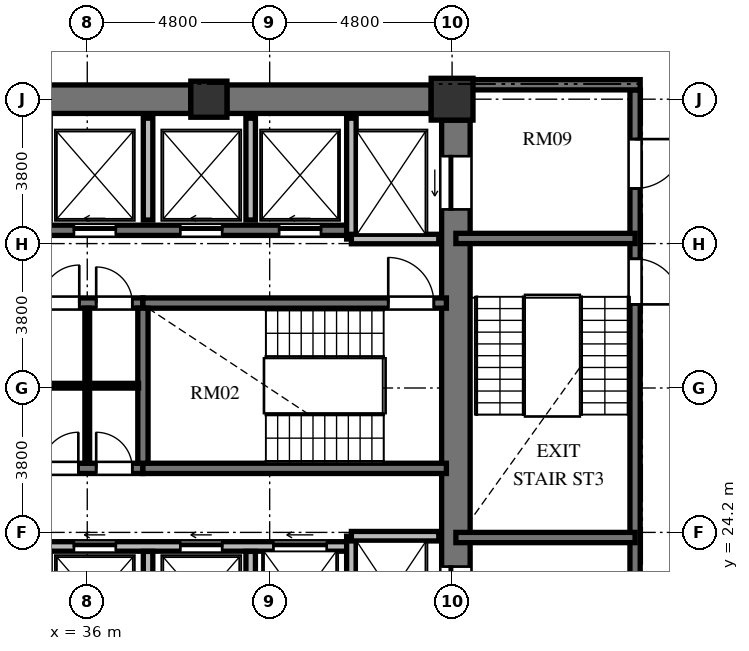
"""IFC4 building model, lengths in metres.
Left out: names, types, materials, properties, quantities, classifications, styles, units other than length and angle.
Written with IfcOpenShell. Run it as: python <this file> out.ifc"""

import sys

from ifc_helpers import new_model, si_unit, direction, frame, frame_2d, origin, origin_2d, place, context, subcontext, project, spatial, rectangle, extrude, element, fill, save


model = new_model("IFC4")
c1 = context("Model", 3, precision=1e-05, world=origin(), true_north=direction((0.0, 1.0)))
c2 = subcontext(c1, "Body", "Model", "MODEL_VIEW")
j1 = project(units=[si_unit("LENGTHUNIT", "METRE"), si_unit("PLANEANGLEUNIT", "RADIAN")], contexts=[c1])
p1 = place(None, origin())
s1 = spatial("IfcSite", under=j1, at=p1, CompositionType="ELEMENT")
p2 = place(p1, origin())
s2 = spatial("IfcBuilding", under=s1, at=p2, CompositionType="ELEMENT")
p3 = place(p2, frame((0.0, 0.0, 110.928)))
s3 = spatial("IfcBuildingStorey", under=s2, at=p3, CompositionType="ELEMENT", Elevation=110.928)
p4 = place(p3, frame((45.6, 35.6, 0.0), z_axis=(0.0, 0.0, 1.0), x_axis=(1.0, 0.0, 0.0)))
e1 = element("IfcColumn", 1, at=p4, inside=s3, PredefinedType="COLUMN", context=c2, shape_type="SweptSolid", body=[
    extrude(rectangle(XDim=1.1, YDim=1.1, at=origin_2d()), origin(), (0.0, 0.0, 1.0), 3.648),
])
p5 = place(p3, frame((39.2, 35.6, 0.0), z_axis=(0.0, 0.0, 1.0), x_axis=(1.0, 0.0, 0.0)))
e2 = element("IfcColumn", 2, at=p5, inside=s3, PredefinedType="COLUMN", context=c2, shape_type="SweptSolid", body=[
    extrude(rectangle(XDim=0.95, YDim=0.95, at=origin_2d()), origin(), (0.0, 0.0, 1.0), 3.648),
])
p6 = place(p3, frame((45.7, 20.95, 0.0), z_axis=(0.0, 0.0, 1.0), x_axis=(0.0, 1.0, 0.0)))
e3 = element("IfcWall", 3, at=p6, inside=s3, PredefinedType="SHEAR", context=c2, shape_type="SweptSolid", body=[
    extrude(rectangle(XDim=14.1, YDim=0.75, at=frame_2d((7.05, 0.0))), origin(), (0.0, 0.0, 1.0), 3.648),
])
p7 = place(p6, frame((11.75, 0.0, 0.0)))
e4 = element("IfcOpeningElement", 4, at=p7, cuts=e3, PredefinedType="OPENING", context=c2, shape_type="SweptSolid", body=[
    extrude(rectangle(XDim=1.4, YDim=2.3, at=frame_2d((0.7, 1.15))), frame((0.0, 0.385, 0.0), z_axis=(0.0, -1.0, 0.0), x_axis=(1.0, 0.0, 0.0)), (0.0, 0.0, 1.0), 0.77),
])
p8 = place(p6, frame((0.95, 0.0, 0.0)))
e5 = element("IfcOpeningElement", 5, at=p8, cuts=e3, PredefinedType="OPENING", context=c2, shape_type="SweptSolid", body=[
    extrude(rectangle(XDim=1.4, YDim=2.3, at=frame_2d((0.7, 1.15))), frame((0.0, 0.385, 0.0), z_axis=(0.0, -1.0, 0.0), x_axis=(1.0, 0.0, 0.0)), (0.0, 0.0, 1.0), 0.77),
])
p9 = place(p3, frame((33.275, 35.6, 0.0), z_axis=(0.0, 0.0, 1.0), x_axis=(1.0, 0.0, 0.0)))
e6 = element("IfcWall", 6, at=p9, inside=s3, PredefinedType="SHEAR", context=c2, shape_type="SweptSolid", body=[
    extrude(rectangle(XDim=5.45, YDim=0.75, at=frame_2d((2.725, 0.0))), origin(), (0.0, 0.0, 1.0), 3.648),
])
p10 = place(p3, frame((39.675, 35.6, 0.0), z_axis=(0.0, 0.0, 1.0), x_axis=(1.0, 0.0, 0.0)))
e7 = element("IfcWall", 7, at=p10, inside=s3, PredefinedType="SHEAR", context=c2, shape_type="SweptSolid", body=[
    extrude(rectangle(XDim=5.375, YDim=0.75, at=frame_2d((2.688, 0.0))), origin(), (0.0, 0.0, 1.0), 3.648),
])
p11 = place(p3, frame((34.535, 30.235, 0.0), z_axis=(0.0, 0.0, 1.0), x_axis=(1.0, 0.0, 0.0)))
e8 = element("IfcWall", 8, at=p11, inside=s3, PredefinedType="SHEAR", context=c2, shape_type="SweptSolid", body=[
    extrude(rectangle(XDim=2.93, YDim=0.27, at=frame_2d((1.465, 0.0))), origin(), (0.0, 0.0, 1.0), 3.648),
])
p12 = place(p11, frame((0.255, 0.0, 0.0)))
e9 = element("IfcOpeningElement", 9, at=p12, cuts=e8, PredefinedType="OPENING", context=c2, shape_type="SweptSolid", body=[
    extrude(rectangle(XDim=1.0, YDim=2.1, at=frame_2d((0.5, 1.05))), frame((0.0, 0.145, 0.0), z_axis=(0.0, -1.0, 0.0), x_axis=(1.0, 0.0, 0.0)), (0.0, 0.0, 1.0), 0.29),
])
p13 = place(p11, frame((1.7, 0.0, 0.0)))
e10 = element("IfcOpeningElement", 10, at=p13, cuts=e8, PredefinedType="OPENING", context=c2, shape_type="SweptSolid", body=[
    extrude(rectangle(XDim=0.95, YDim=2.1, at=frame_2d((0.475, 1.05))), frame((0.0, 0.145, 0.0), z_axis=(0.0, -1.0, 0.0), x_axis=(1.0, 0.0, 0.0)), (0.0, 0.0, 1.0), 0.29),
])
p14 = place(p3, frame((37.465, 30.235, 0.0), z_axis=(0.0, 0.0, 1.0), x_axis=(1.0, 0.0, 0.0)))
e11 = element("IfcWall", 11, at=p14, inside=s3, PredefinedType="SHEAR", context=c2, shape_type="SweptSolid", body=[
    extrude(rectangle(XDim=7.985, YDim=0.27, at=frame_2d((3.992, 0.0))), origin(), (0.0, 0.0, 1.0), 3.648),
])
p15 = place(p14, frame((6.455, 0.0, 0.0)))
e12 = element("IfcOpeningElement", 12, at=p15, cuts=e11, PredefinedType="OPENING", context=c2, shape_type="SweptSolid", body=[
    extrude(rectangle(XDim=1.2, YDim=2.15, at=frame_2d((0.6, 1.075))), frame((0.0, 0.145, 0.0), z_axis=(0.0, -1.0, 0.0), x_axis=(1.0, 0.0, 0.0)), (0.0, 0.0, 1.0), 0.29),
])
p16 = place(p3, frame((34.535, 25.885, 0.0), z_axis=(0.0, 0.0, 1.0), x_axis=(1.0, 0.0, 0.0)))
e13 = element("IfcWall", 13, at=p16, inside=s3, PredefinedType="SHEAR", context=c2, shape_type="SweptSolid", body=[
    extrude(rectangle(XDim=2.93, YDim=0.27, at=frame_2d((1.465, 0.0))), origin(), (0.0, 0.0, 1.0), 3.648),
])
p17 = place(p16, frame((0.28, 0.0, 0.0)))
e14 = element("IfcOpeningElement", 14, at=p17, cuts=e13, PredefinedType="OPENING", context=c2, shape_type="SweptSolid", body=[
    extrude(rectangle(XDim=0.95, YDim=2.1, at=frame_2d((0.475, 1.05))), frame((0.0, 0.145, 0.0), z_axis=(0.0, -1.0, 0.0), x_axis=(1.0, 0.0, 0.0)), (0.0, 0.0, 1.0), 0.29),
])
p18 = place(p16, frame((1.7, 0.0, 0.0)))
e15 = element("IfcOpeningElement", 15, at=p18, cuts=e13, PredefinedType="OPENING", context=c2, shape_type="SweptSolid", body=[
    extrude(rectangle(XDim=0.95, YDim=2.1, at=frame_2d((0.475, 1.05))), frame((0.0, 0.145, 0.0), z_axis=(0.0, -1.0, 0.0), x_axis=(1.0, 0.0, 0.0)), (0.0, 0.0, 1.0), 0.29),
])
p19 = place(p3, frame((37.465, 25.885, 0.0), z_axis=(0.0, 0.0, 1.0), x_axis=(1.0, 0.0, 0.0)))
e16 = element("IfcWall", 16, at=p19, inside=s3, PredefinedType="SHEAR", context=c2, shape_type="SweptSolid", body=[
    extrude(rectangle(XDim=7.985, YDim=0.27, at=frame_2d((3.992, 0.0))), origin(), (0.0, 0.0, 1.0), 3.648),
])
p20 = place(p3, frame((37.465, 26.02, 0.0), z_axis=(0.0, 0.0, 1.0), x_axis=(0.0, 1.0, 0.0)))
e17 = element("IfcWall", 17, at=p20, inside=s3, PredefinedType="SHEAR", context=c2, shape_type="SweptSolid", body=[
    extrude(rectangle(XDim=4.08, YDim=0.27, at=frame_2d((2.04, 0.0))), origin(), (0.0, 0.0, 1.0), 3.648),
])
p21 = place(p3, frame((34.65, 28.06, 0.0), z_axis=(0.0, 0.0, 1.0), x_axis=(1.0, 0.0, 0.0)))
e18 = element("IfcWall", 18, at=p21, inside=s3, PredefinedType="PARTITIONING", context=c2, shape_type="SweptSolid", body=[
    extrude(rectangle(XDim=2.7, YDim=0.125, at=frame_2d((1.35, 0.0))), origin(), (0.0, 0.0, 1.0), 3.428),
])
p22 = place(p3, frame((36.0, 26.02, 0.0), z_axis=(0.0, 0.0, 1.0), x_axis=(0.0, 1.0, 0.0)))
e19 = element("IfcWall", 19, at=p22, inside=s3, PredefinedType="PARTITIONING", context=c2, shape_type="SweptSolid", body=[
    extrude(rectangle(XDim=4.08, YDim=0.125, at=frame_2d((2.04, 0.0))), origin(), (0.0, 0.0, 1.0), 3.428),
])
p23 = place(p3, frame((26.55, 32.15, 0.0), z_axis=(0.0, 0.0, 1.0), x_axis=(1.0, 0.0, 0.0)))
e20 = element("IfcWall", 20, at=p23, inside=s3, PredefinedType="SHEAR", context=c2, shape_type="SweptSolid", body=[
    extrude(rectangle(XDim=16.4, YDim=0.27, at=frame_2d((8.2, 0.0))), origin(), (0.0, 0.0, 1.0), 3.648),
])
p24 = place(p23, frame((1.1, 0.0, 0.0)))
e21 = element("IfcOpeningElement", 21, at=p24, cuts=e20, PredefinedType="OPENING", context=c2, shape_type="SweptSolid", body=[
    extrude(rectangle(XDim=1.1, YDim=2.2, at=frame_2d((0.55, 1.1))), frame((0.0, 0.145, 0.0), z_axis=(0.0, -1.0, 0.0), x_axis=(1.0, 0.0, 0.0)), (0.0, 0.0, 1.0), 0.29),
])
p25 = place(p23, frame((3.7, 0.0, 0.0)))
e22 = element("IfcOpeningElement", 22, at=p25, cuts=e20, PredefinedType="OPENING", context=c2, shape_type="SweptSolid", body=[
    extrude(rectangle(XDim=1.1, YDim=2.2, at=frame_2d((0.55, 1.1))), frame((0.0, 0.145, 0.0), z_axis=(0.0, -1.0, 0.0), x_axis=(1.0, 0.0, 0.0)), (0.0, 0.0, 1.0), 0.29),
])
p26 = place(p23, frame((6.5, 0.0, 0.0)))
e23 = element("IfcOpeningElement", 23, at=p26, cuts=e20, PredefinedType="OPENING", context=c2, shape_type="SweptSolid", body=[
    extrude(rectangle(XDim=1.1, YDim=2.2, at=frame_2d((0.55, 1.1))), frame((0.0, 0.145, 0.0), z_axis=(0.0, -1.0, 0.0), x_axis=(1.0, 0.0, 0.0)), (0.0, 0.0, 1.0), 0.29),
])
p27 = place(p23, frame((9.1, 0.0, 0.0)))
e24 = element("IfcOpeningElement", 24, at=p27, cuts=e20, PredefinedType="OPENING", context=c2, shape_type="SweptSolid", body=[
    extrude(rectangle(XDim=1.1, YDim=2.2, at=frame_2d((0.55, 1.1))), frame((0.0, 0.145, 0.0), z_axis=(0.0, -1.0, 0.0), x_axis=(1.0, 0.0, 0.0)), (0.0, 0.0, 1.0), 0.29),
])
p28 = place(p23, frame((11.9, 0.0, 0.0)))
e25 = element("IfcOpeningElement", 25, at=p28, cuts=e20, PredefinedType="OPENING", context=c2, shape_type="SweptSolid", body=[
    extrude(rectangle(XDim=1.1, YDim=2.2, at=frame_2d((0.55, 1.1))), frame((0.0, 0.145, 0.0), z_axis=(0.0, -1.0, 0.0), x_axis=(1.0, 0.0, 0.0)), (0.0, 0.0, 1.0), 0.29),
])
p29 = place(p23, frame((14.5, 0.0, 0.0)))
e26 = element("IfcOpeningElement", 26, at=p29, cuts=e20, PredefinedType="OPENING", context=c2, shape_type="SweptSolid", body=[
    extrude(rectangle(XDim=1.1, YDim=2.2, at=frame_2d((0.55, 1.1))), frame((0.0, 0.145, 0.0), z_axis=(0.0, -1.0, 0.0), x_axis=(1.0, 0.0, 0.0)), (0.0, 0.0, 1.0), 0.29),
])
p30 = place(p3, frame((26.75, 23.83, 0.0), z_axis=(0.0, 0.0, 1.0), x_axis=(1.0, 0.0, 0.0)))
e27 = element("IfcWall", 27, at=p30, inside=s3, PredefinedType="SOLIDWALL", context=c2, shape_type="SweptSolid", body=[
    extrude(rectangle(XDim=16.2, YDim=0.25, at=frame_2d((8.1, 0.0))), origin(), (0.0, 0.0, 1.0), 3.428),
])
p31 = place(p30, frame((0.9, 0.0, 0.0)))
e28 = element("IfcOpeningElement", 28, at=p31, cuts=e27, PredefinedType="OPENING", context=c2, shape_type="SweptSolid", body=[
    extrude(rectangle(XDim=1.1, YDim=2.2, at=frame_2d((0.55, 1.1))), frame((0.0, 0.135, 0.0), z_axis=(0.0, -1.0, 0.0), x_axis=(1.0, 0.0, 0.0)), (0.0, 0.0, 1.0), 0.27),
])
p32 = place(p30, frame((3.5, 0.0, 0.0)))
e29 = element("IfcOpeningElement", 29, at=p32, cuts=e27, PredefinedType="OPENING", context=c2, shape_type="SweptSolid", body=[
    extrude(rectangle(XDim=1.1, YDim=2.2, at=frame_2d((0.55, 1.1))), frame((0.0, 0.135, 0.0), z_axis=(0.0, -1.0, 0.0), x_axis=(1.0, 0.0, 0.0)), (0.0, 0.0, 1.0), 0.27),
])
p33 = place(p30, frame((6.3, 0.0, 0.0)))
e30 = element("IfcOpeningElement", 30, at=p33, cuts=e27, PredefinedType="OPENING", context=c2, shape_type="SweptSolid", body=[
    extrude(rectangle(XDim=1.1, YDim=2.2, at=frame_2d((0.55, 1.1))), frame((0.0, 0.135, 0.0), z_axis=(0.0, -1.0, 0.0), x_axis=(1.0, 0.0, 0.0)), (0.0, 0.0, 1.0), 0.27),
])
p34 = place(p30, frame((8.9, 0.0, 0.0)))
e31 = element("IfcOpeningElement", 31, at=p34, cuts=e27, PredefinedType="OPENING", context=c2, shape_type="SweptSolid", body=[
    extrude(rectangle(XDim=1.1, YDim=2.2, at=frame_2d((0.55, 1.1))), frame((0.0, 0.135, 0.0), z_axis=(0.0, -1.0, 0.0), x_axis=(1.0, 0.0, 0.0)), (0.0, 0.0, 1.0), 0.27),
])
p35 = place(p30, frame((11.7, 0.0, 0.0)))
e32 = element("IfcOpeningElement", 32, at=p35, cuts=e27, PredefinedType="OPENING", context=c2, shape_type="SweptSolid", body=[
    extrude(rectangle(XDim=1.1, YDim=2.2, at=frame_2d((0.55, 1.1))), frame((0.0, 0.135, 0.0), z_axis=(0.0, -1.0, 0.0), x_axis=(1.0, 0.0, 0.0)), (0.0, 0.0, 1.0), 0.27),
])
p36 = place(p30, frame((14.15, 0.0, 0.0)))
e33 = element("IfcOpeningElement", 33, at=p36, cuts=e27, PredefinedType="OPENING", context=c2, shape_type="SweptSolid", body=[
    extrude(rectangle(XDim=1.4, YDim=2.3, at=frame_2d((0.7, 1.15))), frame((0.0, 0.135, 0.0), z_axis=(0.0, -1.0, 0.0), x_axis=(1.0, 0.0, 0.0)), (0.0, 0.0, 1.0), 0.27),
])
p37 = place(p3, frame((42.95, 31.92, 0.0), z_axis=(0.0, 0.0, 1.0), x_axis=(0.0, 1.0, 0.0)))
e34 = element("IfcWall", 34, at=p37, inside=s3, PredefinedType="SOLIDWALL", context=c2, shape_type="SweptSolid", body=[
    extrude(rectangle(XDim=3.18, YDim=0.25, at=frame_2d((1.59, 0.0))), origin(), (0.0, 0.0, 1.0), 3.428),
])
p38 = place(p3, frame((42.95, 31.92, 0.0), z_axis=(0.0, 0.0, 1.0), x_axis=(1.0, 0.0, 0.0)))
e35 = element("IfcWall", 35, at=p38, inside=s3, PredefinedType="SOLIDWALL", context=c2, shape_type="SweptSolid", body=[
    extrude(rectangle(XDim=2.3, YDim=0.25, at=frame_2d((1.15, 0.0))), origin(), (0.0, 0.0, 1.0), 3.428),
])
p39 = place(p3, frame((42.95, 20.9, 0.0), z_axis=(0.0, 0.0, 1.0), x_axis=(0.0, 1.0, 0.0)))
e36 = element("IfcWall", 36, at=p39, inside=s3, PredefinedType="SOLIDWALL", context=c2, shape_type="SweptSolid", body=[
    extrude(rectangle(XDim=3.2, YDim=0.25, at=frame_2d((1.6, 0.0))), origin(), (0.0, 0.0, 1.0), 3.428),
])
p40 = place(p3, frame((42.95, 24.1, 0.0), z_axis=(0.0, 0.0, 1.0), x_axis=(1.0, 0.0, 0.0)))
e37 = element("IfcWall", 37, at=p40, inside=s3, PredefinedType="SOLIDWALL", context=c2, shape_type="SweptSolid", body=[
    extrude(rectangle(XDim=2.3, YDim=0.25, at=frame_2d((1.15, 0.0))), origin(), (0.0, 0.0, 1.0), 3.428),
])
p41 = place(p3, frame((37.6, 32.42, 0.0), z_axis=(0.0, 0.0, 1.0), x_axis=(0.0, 1.0, 0.0)))
e38 = element("IfcWall", 38, at=p41, inside=s3, PredefinedType="SOLIDWALL", context=c2, shape_type="SweptSolid", body=[
    extrude(rectangle(XDim=2.68, YDim=0.25, at=frame_2d((1.34, 0.0))), origin(), (0.0, 0.0, 1.0), 3.428),
])
p42 = place(p3, frame((37.6, 20.9, 0.0), z_axis=(0.0, 0.0, 1.0), x_axis=(0.0, 1.0, 0.0)))
e39 = element("IfcWall", 39, at=p42, inside=s3, PredefinedType="SOLIDWALL", context=c2, shape_type="SweptSolid", body=[
    extrude(rectangle(XDim=2.8, YDim=0.25, at=frame_2d((1.4, 0.0))), origin(), (0.0, 0.0, 1.0), 3.428),
])
p43 = place(p3, frame((40.3, 32.42, 0.0), z_axis=(0.0, 0.0, 1.0), x_axis=(0.0, 1.0, 0.0)))
e40 = element("IfcWall", 40, at=p43, inside=s3, PredefinedType="SOLIDWALL", context=c2, shape_type="SweptSolid", body=[
    extrude(rectangle(XDim=2.68, YDim=0.25, at=frame_2d((1.34, 0.0))), origin(), (0.0, 0.0, 1.0), 3.428),
])
p44 = place(p3, frame((40.3, 20.9, 0.0), z_axis=(0.0, 0.0, 1.0), x_axis=(0.0, 1.0, 0.0)))
e41 = element("IfcWall", 41, at=p44, inside=s3, PredefinedType="SOLIDWALL", context=c2, shape_type="SweptSolid", body=[
    extrude(rectangle(XDim=2.8, YDim=0.25, at=frame_2d((1.4, 0.0))), origin(), (0.0, 0.0, 1.0), 3.428),
])
p45 = place(p3, frame((50.415, 35.845, 0.0), z_axis=(0.0, 0.0, 1.0), x_axis=(0.0, -1.0, 0.0)))
e42 = element("IfcWall", 42, at=p45, inside=s3, PredefinedType="SHEAR", context=c2, shape_type="SweptSolid", body=[
    extrude(rectangle(XDim=15.825, YDim=0.27, at=frame_2d((7.913, 0.0))), origin(), (0.0, 0.0, 1.0), 3.648),
])
p46 = place(p45, frame((4.445, 0.0, 0.0)))
e43 = element("IfcOpeningElement", 43, at=p46, cuts=e42, PredefinedType="OPENING", context=c2, shape_type="SweptSolid", body=[
    extrude(rectangle(XDim=1.2, YDim=2.15, at=frame_2d((0.6, 1.075))), frame((0.0, 0.145, 0.0), z_axis=(0.0, -1.0, 0.0), x_axis=(1.0, 0.0, 0.0)), (0.0, 0.0, 1.0), 0.29),
])
p47 = place(p45, frame((1.295, 0.0, 0.0)))
e44 = element("IfcOpeningElement", 44, at=p47, cuts=e42, PredefinedType="OPENING", context=c2, shape_type="SweptSolid", body=[
    extrude(rectangle(XDim=1.3, YDim=2.2, at=frame_2d((0.65, 1.1))), frame((0.0, 0.145, 0.0), z_axis=(0.0, -1.0, 0.0), x_axis=(1.0, 0.0, 0.0)), (0.0, 0.0, 1.0), 0.29),
])
p48 = place(p45, frame((13.095, 0.0, 0.0)))
e45 = element("IfcOpeningElement", 45, at=p48, cuts=e42, PredefinedType="OPENING", context=c2, shape_type="SweptSolid", body=[
    extrude(rectangle(XDim=1.3, YDim=2.2, at=frame_2d((0.65, 1.1))), frame((0.0, 0.145, 0.0), z_axis=(0.0, -1.0, 0.0), x_axis=(1.0, 0.0, 0.0)), (0.0, 0.0, 1.0), 0.29),
])
p49 = place(p3, frame((46.075, 35.98, 0.0), z_axis=(0.0, 0.0, 1.0), x_axis=(1.0, 0.0, 0.0)))
e46 = element("IfcWall", 46, at=p49, inside=s3, PredefinedType="SHEAR", context=c2, shape_type="SweptSolid", body=[
    extrude(rectangle(XDim=4.475, YDim=0.27, at=frame_2d((2.238, 0.0))), origin(), (0.0, 0.0, 1.0), 3.648),
])
for number, where, z_axis, x_axis in (
    (47, (45.7, 31.935, 0.0), (0.0, 0.0, 1.0), (1.0, 0.0, 0.0)),
    (48, (45.7, 24.065, 0.0), (0.0, 0.0, 1.0), (1.0, 0.0, 0.0)),
):
    element("IfcWall", number, at=place(p3, frame(where, z_axis=z_axis, x_axis=x_axis)), inside=s3, PredefinedType="SHEAR", context=c2, shape_type="SweptSolid", body=[
        extrude(rectangle(XDim=4.715, YDim=0.27, at=frame_2d((2.357, 0.0))), origin(), (0.0, 0.0, 1.0), 3.648),
    ])
p50 = place(p15, origin())
e49 = element("IfcDoor", 49, at=p50, inside=s3, OperationType="SINGLE_SWING_LEFT", PredefinedType="DOOR", context=c2, shape_type="SweptSolid", body=[
    extrude(rectangle(XDim=1.2, YDim=2.15, at=frame_2d((0.6, 1.075))), frame((0.0, 0.025, 0.0), z_axis=(0.0, -1.0, 0.0), x_axis=(1.0, 0.0, 0.0)), (0.0, 0.0, 1.0), 0.05),
])
fill(e12, e49)
p51 = place(p17, origin())
e50 = element("IfcDoor", 50, at=p51, inside=s3, OperationType="SINGLE_SWING_RIGHT", PredefinedType="DOOR", context=c2, shape_type="SweptSolid", body=[
    extrude(rectangle(XDim=0.95, YDim=2.1, at=frame_2d((0.475, 1.05))), frame((0.0, 0.025, 0.0), z_axis=(0.0, -1.0, 0.0), x_axis=(1.0, 0.0, 0.0)), (0.0, 0.0, 1.0), 0.05),
])
fill(e14, e50)
p52 = place(p18, origin())
e51 = element("IfcDoor", 51, at=p52, inside=s3, OperationType="SINGLE_SWING_LEFT", PredefinedType="DOOR", context=c2, shape_type="SweptSolid", body=[
    extrude(rectangle(XDim=0.95, YDim=2.1, at=frame_2d((0.475, 1.05))), frame((0.0, 0.025, 0.0), z_axis=(0.0, -1.0, 0.0), x_axis=(1.0, 0.0, 0.0)), (0.0, 0.0, 1.0), 0.05),
])
fill(e15, e51)
p53 = place(p12, origin())
e52 = element("IfcDoor", 52, at=p53, inside=s3, OperationType="SINGLE_SWING_RIGHT", PredefinedType="DOOR", context=c2, shape_type="SweptSolid", body=[
    extrude(rectangle(XDim=1.0, YDim=2.1, at=frame_2d((0.5, 1.05))), frame((0.0, 0.025, 0.0), z_axis=(0.0, -1.0, 0.0), x_axis=(1.0, 0.0, 0.0)), (0.0, 0.0, 1.0), 0.05),
])
fill(e9, e52)
p54 = place(p13, origin())
e53 = element("IfcDoor", 53, at=p54, inside=s3, OperationType="SINGLE_SWING_LEFT", PredefinedType="DOOR", context=c2, shape_type="SweptSolid", body=[
    extrude(rectangle(XDim=0.95, YDim=2.1, at=frame_2d((0.475, 1.05))), frame((0.0, 0.025, 0.0), z_axis=(0.0, -1.0, 0.0), x_axis=(1.0, 0.0, 0.0)), (0.0, 0.0, 1.0), 0.05),
])
fill(e10, e53)
p55 = place(p27, origin())
e54 = element("IfcDoor", 54, at=p55, inside=s3, OperationType="SLIDING_TO_LEFT", PredefinedType="DOOR", context=c2, shape_type="SweptSolid", body=[
    extrude(rectangle(XDim=1.1, YDim=2.2, at=frame_2d((0.55, 1.1))), frame((0.0, 0.025, 0.0), z_axis=(0.0, -1.0, 0.0), x_axis=(1.0, 0.0, 0.0)), (0.0, 0.0, 1.0), 0.05),
])
fill(e24, e54)
p56 = place(p34, origin())
e55 = element("IfcDoor", 55, at=p56, inside=s3, OperationType="SLIDING_TO_LEFT", PredefinedType="DOOR", context=c2, shape_type="SweptSolid", body=[
    extrude(rectangle(XDim=1.1, YDim=2.2, at=frame_2d((0.55, 1.1))), frame((0.0, 0.025, 0.0), z_axis=(0.0, -1.0, 0.0), x_axis=(1.0, 0.0, 0.0)), (0.0, 0.0, 1.0), 0.05),
])
fill(e31, e55)
p57 = place(p28, origin())
e56 = element("IfcDoor", 56, at=p57, inside=s3, OperationType="SLIDING_TO_LEFT", PredefinedType="DOOR", context=c2, shape_type="SweptSolid", body=[
    extrude(rectangle(XDim=1.1, YDim=2.2, at=frame_2d((0.55, 1.1))), frame((0.0, 0.025, 0.0), z_axis=(0.0, -1.0, 0.0), x_axis=(1.0, 0.0, 0.0)), (0.0, 0.0, 1.0), 0.05),
])
fill(e25, e56)
p58 = place(p29, origin())
e57 = element("IfcDoor", 57, at=p58, inside=s3, OperationType="SLIDING_TO_LEFT", PredefinedType="DOOR", context=c2, shape_type="SweptSolid", body=[
    extrude(rectangle(XDim=1.1, YDim=2.2, at=frame_2d((0.55, 1.1))), frame((0.0, 0.025, 0.0), z_axis=(0.0, -1.0, 0.0), x_axis=(1.0, 0.0, 0.0)), (0.0, 0.0, 1.0), 0.05),
])
fill(e26, e57)
p59 = place(p35, origin())
e58 = element("IfcDoor", 58, at=p59, inside=s3, OperationType="SLIDING_TO_LEFT", PredefinedType="DOOR", context=c2, shape_type="SweptSolid", body=[
    extrude(rectangle(XDim=1.1, YDim=2.2, at=frame_2d((0.55, 1.1))), frame((0.0, 0.025, 0.0), z_axis=(0.0, -1.0, 0.0), x_axis=(1.0, 0.0, 0.0)), (0.0, 0.0, 1.0), 0.05),
])
fill(e32, e58)
p60 = place(p7, origin())
e59 = element("IfcDoor", 59, at=p60, inside=s3, OperationType="SLIDING_TO_LEFT", PredefinedType="DOOR", context=c2, shape_type="SweptSolid", body=[
    extrude(rectangle(XDim=1.4, YDim=2.3, at=frame_2d((0.7, 1.15))), frame((0.0, 0.025, 0.0), z_axis=(0.0, -1.0, 0.0), x_axis=(1.0, 0.0, 0.0)), (0.0, 0.0, 1.0), 0.05),
])
fill(e4, e59)
p61 = place(p8, origin())
e60 = element("IfcDoor", 60, at=p61, inside=s3, OperationType="SLIDING_TO_LEFT", PredefinedType="DOOR", context=c2, shape_type="SweptSolid", body=[
    extrude(rectangle(XDim=1.4, YDim=2.3, at=frame_2d((0.7, 1.15))), frame((0.0, 0.025, 0.0), z_axis=(0.0, -1.0, 0.0), x_axis=(1.0, 0.0, 0.0)), (0.0, 0.0, 1.0), 0.05),
])
fill(e5, e60)
p62 = place(p36, origin())
e61 = element("IfcDoor", 61, at=p62, inside=s3, OperationType="SLIDING_TO_LEFT", PredefinedType="DOOR", context=c2, shape_type="SweptSolid", body=[
    extrude(rectangle(XDim=1.4, YDim=2.3, at=frame_2d((0.7, 1.15))), frame((0.0, 0.025, 0.0), z_axis=(0.0, -1.0, 0.0), x_axis=(1.0, 0.0, 0.0)), (0.0, 0.0, 1.0), 0.05),
])
fill(e33, e61)
p63 = place(p46, origin())
e62 = element("IfcDoor", 62, at=p63, inside=s3, OperationType="SINGLE_SWING_RIGHT", PredefinedType="DOOR", context=c2, shape_type="SweptSolid", body=[
    extrude(rectangle(XDim=1.2, YDim=2.15, at=frame_2d((0.6, 1.075))), frame((0.0, 0.025, 0.0), z_axis=(0.0, -1.0, 0.0), x_axis=(1.0, 0.0, 0.0)), (0.0, 0.0, 1.0), 0.05),
])
fill(e43, e62)
p64 = place(p47, origin())
e63 = element("IfcDoor", 63, at=p64, inside=s3, OperationType="SINGLE_SWING_LEFT", PredefinedType="DOOR", context=c2, shape_type="SweptSolid", body=[
    extrude(rectangle(XDim=1.3, YDim=2.2, at=frame_2d((0.65, 1.1))), frame((0.0, 0.025, 0.0), z_axis=(0.0, -1.0, 0.0), x_axis=(1.0, 0.0, 0.0)), (0.0, 0.0, 1.0), 0.05),
])
fill(e44, e63)
save(model, sys.argv[1])
